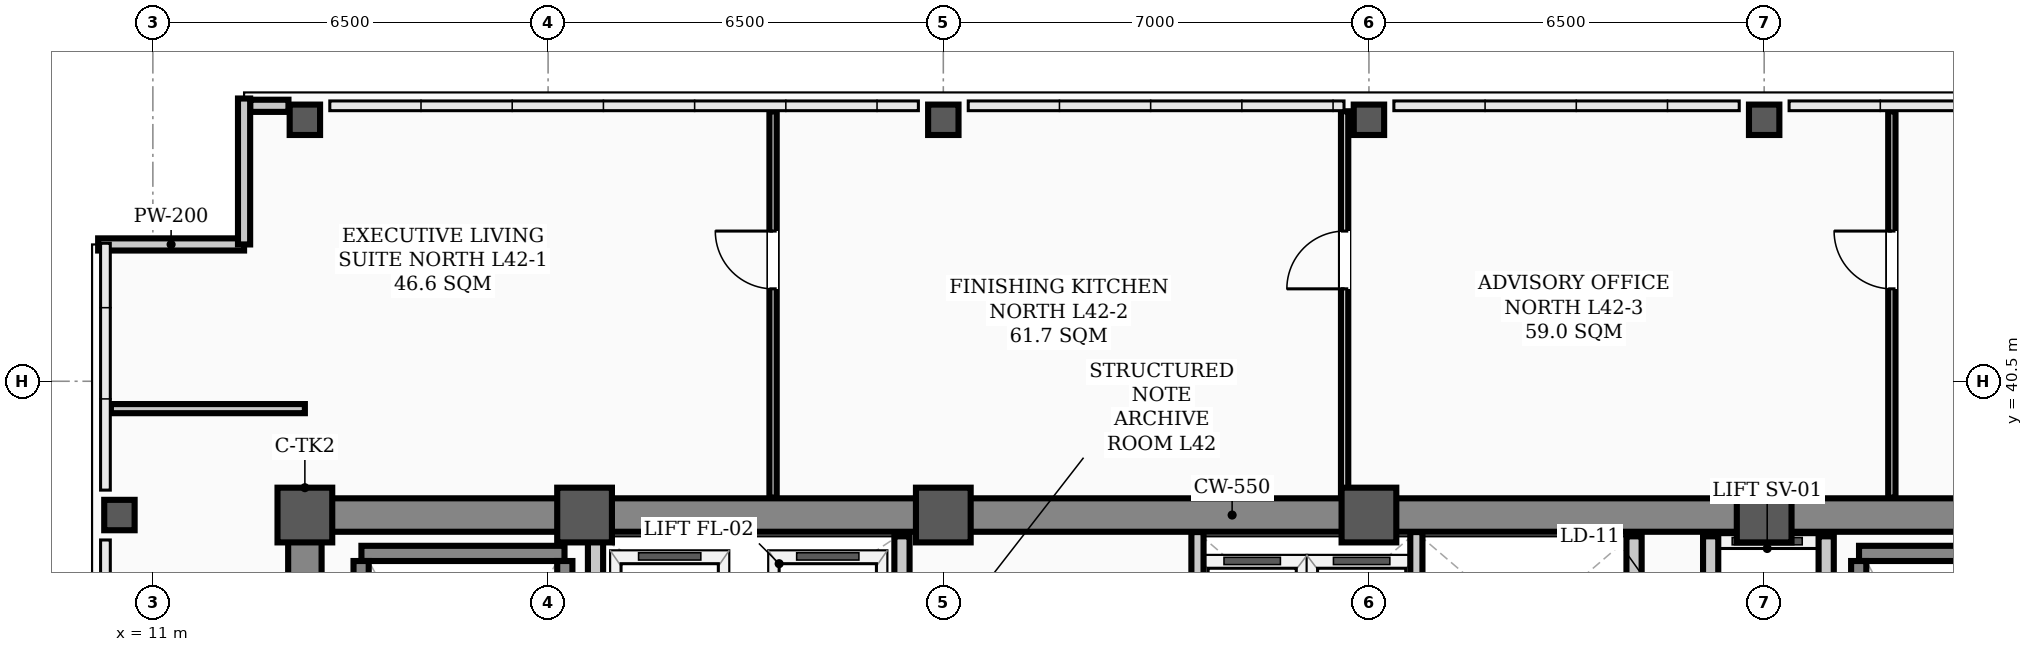
"""IFC4 building model, lengths in metres.
Left out: names, types, materials, properties, quantities, classifications, styles, units other than length and angle.
Written with IfcOpenShell. Run it as: python <this file> out.ifc"""

import sys

from ifc_helpers import new_model, si_unit, direction, frame, frame_2d, origin, origin_2d, place, context, subcontext, project, spatial, rectangle, hollow_rectangle, extrude, element, fill, save


model = new_model("IFC4")
c1 = context("Model", 3, precision=1e-05, world=origin(), true_north=direction((0.0, 1.0)))
c2 = subcontext(c1, "Body", "Model", "MODEL_VIEW")
j1 = project(units=[si_unit("LENGTHUNIT", "METRE"), si_unit("PLANEANGLEUNIT", "RADIAN")], contexts=[c1])
p1 = place(None, origin())
s1 = spatial("IfcSite", under=j1, at=p1, CompositionType="ELEMENT")
p2 = place(p1, origin())
s2 = spatial("IfcBuilding", under=s1, at=p2, CompositionType="ELEMENT")
p3 = place(p2, frame((0.0, 0.0, 169.5)))
s3 = spatial("IfcBuildingStorey", under=s2, at=p3, CompositionType="ELEMENT", Elevation=169.5)
for number, where, z_axis, x_axis in (
    (1, (13.5, 38.3, 0.0), (0.0, 0.0, 1.0), (1.0, 0.0, 0.0)),
    (2, (18.1, 38.3, 0.0), (0.0, 0.0, 1.0), (1.0, 0.0, 0.0)),
    (3, (24.0, 38.3, 0.0), (0.0, 0.0, 1.0), (1.0, 0.0, 0.0)),
    (4, (31.0, 38.3, 0.0), (0.0, 0.0, 1.0), (1.0, 0.0, 0.0)),
    (5, (37.5, 38.3, 0.0), (0.0, 0.0, 1.0), (1.0, 0.0, 0.0)),
):
    element("IfcColumn", number, at=place(p3, frame(where, z_axis=z_axis, x_axis=x_axis)), inside=s3, PredefinedType="COLUMN", context=c2, shape_type="SweptSolid", body=[
        extrude(hollow_rectangle(XDim=0.9, YDim=0.9, WallThickness=0.035, InnerFilletRadius=0.017, OuterFilletRadius=0.052, at=origin_2d()), origin(), (0.0, 0.0, 1.0), 3.9),
    ])
for number, where, z_axis, x_axis in (
    (6, (10.45, 38.3, 0.0), (0.0, 0.0, 1.0), (1.0, 0.0, 0.0)),
    (7, (13.5, 44.8, 0.0), (0.0, 0.0, 1.0), (1.0, 0.0, 0.0)),
    (8, (24.0, 44.8, 0.0), (0.0, 0.0, 1.0), (1.0, 0.0, 0.0)),
    (9, (31.0, 44.8, 0.0), (0.0, 0.0, 1.0), (1.0, 0.0, 0.0)),
    (10, (37.5, 44.8, 0.0), (0.0, 0.0, 1.0), (1.0, 0.0, 0.0)),
):
    element("IfcColumn", number, at=place(p3, frame(where, z_axis=z_axis, x_axis=x_axis)), inside=s3, PredefinedType="COLUMN", context=c2, shape_type="SweptSolid", body=[
        extrude(hollow_rectangle(XDim=0.5, YDim=0.5, WallThickness=0.024, InnerFilletRadius=0.012, OuterFilletRadius=0.036, at=origin_2d()), origin(), (0.0, 0.0, 1.0), 3.9),
    ])
p4 = place(p3, frame((12.6, 45.03, 0.0), z_axis=(0.0, 0.0, 1.0), x_axis=(1.0, 0.0, 0.0)))
e11 = element("IfcWall", 11, at=p4, inside=s3, PredefinedType="PARAPET", context=c2, shape_type="SweptSolid", body=[
    extrude(rectangle(XDim=0.63, YDim=0.2, at=frame_2d((0.315, 0.0))), origin(), (0.0, 0.0, 1.0), 1.2),
])
for number, where, z_axis, x_axis in (
    (12, (10.1, 42.75, 0.0), (0.0, 0.0, 1.0), (1.0, 0.0, 0.0)),
    (13, (12.5, 42.75, 0.0), (0.0, 0.0, 1.0), (0.0, 1.0, 0.0)),
):
    element("IfcWall", number, at=place(p3, frame(where, z_axis=z_axis, x_axis=x_axis)), inside=s3, PredefinedType="PARAPET", context=c2, shape_type="SweptSolid", body=[
        extrude(rectangle(XDim=2.4, YDim=0.2, at=frame_2d((1.2, 0.0))), origin(), (0.0, 0.0, 1.0), 1.2),
    ])
p5 = place(p3, frame((13.5, 38.3, 0.0), z_axis=(0.0, 0.0, 1.0), x_axis=(1.0, 0.0, 0.0)))
e14 = element("IfcWall", 14, at=p5, inside=s3, PredefinedType="SHEAR", context=c2, shape_type="SweptSolid", body=[
    extrude(rectangle(XDim=30.5, YDim=0.55, at=frame_2d((15.25, 0.0))), origin(), (0.0, 0.0, 1.0), 3.72),
])
p6 = place(p3, frame((13.5, 29.35, 0.0), z_axis=(0.0, 0.0, 1.0), x_axis=(0.0, 1.0, 0.0)))
e15 = element("IfcWall", 15, at=p6, inside=s3, PredefinedType="SHEAR", context=c2, shape_type="SweptSolid", body=[
    extrude(rectangle(XDim=8.6, YDim=0.55, at=frame_2d((4.3, 0.0))), origin(), (0.0, 0.0, 1.0), 3.72),
])
p7 = place(p3, frame((14.43, 37.669, 0.0), z_axis=(0.0, 0.0, 1.0), x_axis=(1.0, 0.0, 0.0)))
e16 = element("IfcWall", 16, at=p7, inside=s3, PredefinedType="STANDARD", context=c2, shape_type="SweptSolid", body=[
    extrude(rectangle(XDim=3.34, YDim=0.25, at=frame_2d((1.67, 0.0))), origin(), (0.0, 0.0, 1.0), 3.72),
])
for number, where, z_axis, x_axis in (
    (17, (14.425, 30.36, 0.0), (0.0, 0.0, 1.0), (0.0, 1.0, 0.0)),
    (18, (17.775, 30.36, 0.0), (0.0, 0.0, 1.0), (0.0, 1.0, 0.0)),
):
    element("IfcWall", number, at=place(p3, frame(where, z_axis=z_axis, x_axis=x_axis)), inside=s3, PredefinedType="STANDARD", context=c2, shape_type="SweptSolid", body=[
        extrude(rectangle(XDim=7.184, YDim=0.25, at=frame_2d((3.592, 0.0))), origin(), (0.0, 0.0, 1.0), 3.72),
    ])
p8 = place(p3, frame((39.06, 37.669, 0.0), z_axis=(0.0, 0.0, 1.0), x_axis=(1.0, 0.0, 0.0)))
e19 = element("IfcWall", 19, at=p8, inside=s3, PredefinedType="STANDARD", context=c2, shape_type="SweptSolid", body=[
    extrude(rectangle(XDim=3.34, YDim=0.25, at=frame_2d((1.67, 0.0))), origin(), (0.0, 0.0, 1.0), 3.72),
])
p9 = place(p3, frame((39.055, 30.36, 0.0), z_axis=(0.0, 0.0, 1.0), x_axis=(0.0, 1.0, 0.0)))
e20 = element("IfcWall", 20, at=p9, inside=s3, PredefinedType="STANDARD", context=c2, shape_type="SweptSolid", body=[
    extrude(rectangle(XDim=7.184, YDim=0.25, at=frame_2d((3.592, 0.0))), origin(), (0.0, 0.0, 1.0), 3.72),
])
p10 = place(p3, frame((36.62, 31.95, 0.0), z_axis=(0.0, 0.0, 1.0), x_axis=(0.0, 1.0, 0.0)))
e21 = element("IfcWall", 21, at=p10, inside=s3, PredefinedType="STANDARD", context=c2, shape_type="SweptSolid", body=[
    extrude(rectangle(XDim=6.0, YDim=0.25, at=frame_2d((3.0, 0.0))), origin(), (0.0, 0.0, 1.0), 3.35),
])
p11 = place(p10, frame((0.9, 0.0, 0.0)))
e22 = element("IfcOpeningElement", 22, at=p11, cuts=e21, PredefinedType="OPENING", context=c2, shape_type="SweptSolid", body=[
    extrude(rectangle(XDim=1.1, YDim=2.08, at=frame_2d((0.55, 1.04))), frame((0.0, 0.135, 0.0), z_axis=(0.0, -1.0, 0.0), x_axis=(1.0, 0.0, 0.0)), (0.0, 0.0, 1.0), 0.27),
])
p12 = place(p10, frame((4.0, 0.0, 0.0)))
e23 = element("IfcOpeningElement", 23, at=p12, cuts=e21, PredefinedType="OPENING", context=c2, shape_type="SweptSolid", body=[
    extrude(rectangle(XDim=1.1, YDim=2.08, at=frame_2d((0.55, 1.04))), frame((0.0, 0.135, 0.0), z_axis=(0.0, -1.0, 0.0), x_axis=(1.0, 0.0, 0.0)), (0.0, 0.0, 1.0), 0.27),
])
p13 = place(p3, frame((38.52, 31.95, 0.0), z_axis=(0.0, 0.0, 1.0), x_axis=(0.0, 1.0, 0.0)))
e24 = element("IfcWall", 24, at=p13, inside=s3, PredefinedType="STANDARD", context=c2, shape_type="SweptSolid", body=[
    extrude(rectangle(XDim=6.0, YDim=0.25, at=frame_2d((3.0, 0.0))), origin(), (0.0, 0.0, 1.0), 3.35),
])
for number, where, z_axis, x_axis in (
    (25, (18.28, 34.62, 0.0), (0.0, 0.0, 1.0), (0.0, 1.0, 0.0)),
    (26, (23.32, 34.62, 0.0), (0.0, 0.0, 1.0), (0.0, 1.0, 0.0)),
):
    element("IfcWall", number, at=place(p3, frame(where, z_axis=z_axis, x_axis=x_axis)), inside=s3, PredefinedType="STANDARD", context=c2, shape_type="SweptSolid", body=[
        extrude(rectangle(XDim=3.33, YDim=0.25, at=frame_2d((1.665, 0.0))), origin(), (0.0, 0.0, 1.0), 3.35),
    ])
p14 = place(p3, frame((35.36, 34.9, 0.0), z_axis=(0.0, 0.0, 1.0), x_axis=(0.0, 1.0, 0.0)))
e27 = element("IfcWall", 27, at=p14, inside=s3, PredefinedType="STANDARD", context=c2, shape_type="SweptSolid", body=[
    extrude(rectangle(XDim=3.05, YDim=0.25, at=frame_2d((1.525, 0.0))), origin(), (0.0, 0.0, 1.0), 3.35),
])
p15 = place(p3, frame((10.31, 40.05, 0.0), z_axis=(0.0, 0.0, 1.0), x_axis=(1.0, 0.0, 0.0)))
e28 = element("IfcWall", 28, at=p15, inside=s3, PredefinedType="PARTITIONING", context=c2, shape_type="SweptSolid", body=[
    extrude(rectangle(XDim=3.19, YDim=0.15, at=frame_2d((1.595, 0.0))), origin(), (0.0, 0.0, 1.0), 3.2),
])
p16 = place(p3, frame((21.2, 38.585, 0.0), z_axis=(0.0, 0.0, 1.0), x_axis=(0.0, 1.0, 0.0)))
e29 = element("IfcWall", 29, at=p16, inside=s3, PredefinedType="PARTITIONING", context=c2, shape_type="SweptSolid", body=[
    extrude(rectangle(XDim=6.355, YDim=0.12, at=frame_2d((3.177, 0.0))), origin(), (0.0, 0.0, 1.0), 3.212),
])
p17 = place(p16, frame((3.435, 0.0, 0.0)))
e30 = element("IfcOpeningElement", 30, at=p17, cuts=e29, PredefinedType="OPENING", context=c2, shape_type="SweptSolid", body=[
    extrude(rectangle(XDim=0.95, YDim=2.08, at=frame_2d((0.475, 1.04))), frame((0.0, 0.07, 0.0), z_axis=(0.0, -1.0, 0.0), x_axis=(1.0, 0.0, 0.0)), (0.0, 0.0, 1.0), 0.14),
])
p18 = place(p3, frame((30.6, 38.585, 0.0), z_axis=(0.0, 0.0, 1.0), x_axis=(0.0, 1.0, 0.0)))
e31 = element("IfcWall", 31, at=p18, inside=s3, PredefinedType="PARTITIONING", context=c2, shape_type="SweptSolid", body=[
    extrude(rectangle(XDim=6.355, YDim=0.12, at=frame_2d((3.177, 0.0))), origin(), (0.0, 0.0, 1.0), 3.2),
])
p19 = place(p18, frame((3.435, 0.0, 0.0)))
e32 = element("IfcOpeningElement", 32, at=p19, cuts=e31, PredefinedType="OPENING", context=c2, shape_type="SweptSolid", body=[
    extrude(rectangle(XDim=0.95, YDim=2.08, at=frame_2d((0.475, 1.04))), frame((0.0, 0.07, 0.0), z_axis=(0.0, -1.0, 0.0), x_axis=(1.0, 0.0, 0.0)), (0.0, 0.0, 1.0), 0.14),
])
p20 = place(p3, frame((39.6, 38.585, 0.0), z_axis=(0.0, 0.0, 1.0), x_axis=(0.0, 1.0, 0.0)))
e33 = element("IfcWall", 33, at=p20, inside=s3, PredefinedType="PARTITIONING", context=c2, shape_type="SweptSolid", body=[
    extrude(rectangle(XDim=6.355, YDim=0.12, at=frame_2d((3.177, 0.0))), origin(), (0.0, 0.0, 1.0), 3.212),
])
p21 = place(p20, frame((3.435, 0.0, 0.0)))
e34 = element("IfcOpeningElement", 34, at=p21, cuts=e33, PredefinedType="OPENING", context=c2, shape_type="SweptSolid", body=[
    extrude(rectangle(XDim=0.95, YDim=2.08, at=frame_2d((0.475, 1.04))), frame((0.0, 0.07, 0.0), z_axis=(0.0, -1.0, 0.0), x_axis=(1.0, 0.0, 0.0)), (0.0, 0.0, 1.0), 0.14),
])
for number, where, z_axis, x_axis in (
    (35, (28.18, 34.9, 0.0), (0.0, 0.0, 1.0), (0.0, 1.0, 0.0)),
    (36, (31.78, 34.9, 0.0), (0.0, 0.0, 1.0), (0.0, 1.0, 0.0)),
):
    element("IfcWall", number, at=place(p3, frame(where, z_axis=z_axis, x_axis=x_axis)), inside=s3, PredefinedType="STANDARD", context=c2, shape_type="SweptSolid", body=[
        extrude(rectangle(XDim=3.12, YDim=0.2, at=frame_2d((1.56, 0.0))), origin(), (0.0, 0.0, 1.0), 3.35),
    ])
p22 = place(p17, origin())
e37 = element("IfcDoor", 37, at=p22, inside=s3, OperationType="SINGLE_SWING_RIGHT", PredefinedType="DOOR", context=c2, shape_type="SweptSolid", body=[
    extrude(rectangle(XDim=0.95, YDim=2.08, at=frame_2d((0.475, 1.04))), frame((0.0, 0.025, 0.0), z_axis=(0.0, -1.0, 0.0), x_axis=(1.0, 0.0, 0.0)), (0.0, 0.0, 1.0), 0.05),
])
fill(e30, e37)
p23 = place(p19, origin())
e38 = element("IfcDoor", 38, at=p23, inside=s3, OperationType="SINGLE_SWING_LEFT", PredefinedType="DOOR", context=c2, shape_type="SweptSolid", body=[
    extrude(rectangle(XDim=0.95, YDim=2.08, at=frame_2d((0.475, 1.04))), frame((0.0, 0.025, 0.0), z_axis=(0.0, -1.0, 0.0), x_axis=(1.0, 0.0, 0.0)), (0.0, 0.0, 1.0), 0.05),
])
fill(e32, e38)
p24 = place(p21, origin())
e39 = element("IfcDoor", 39, at=p24, inside=s3, OperationType="SINGLE_SWING_RIGHT", PredefinedType="DOOR", context=c2, shape_type="SweptSolid", body=[
    extrude(rectangle(XDim=0.95, YDim=2.08, at=frame_2d((0.475, 1.04))), frame((0.0, 0.025, 0.0), z_axis=(0.0, -1.0, 0.0), x_axis=(1.0, 0.0, 0.0)), (0.0, 0.0, 1.0), 0.05),
])
fill(e34, e39)
save(model, sys.argv[1])
